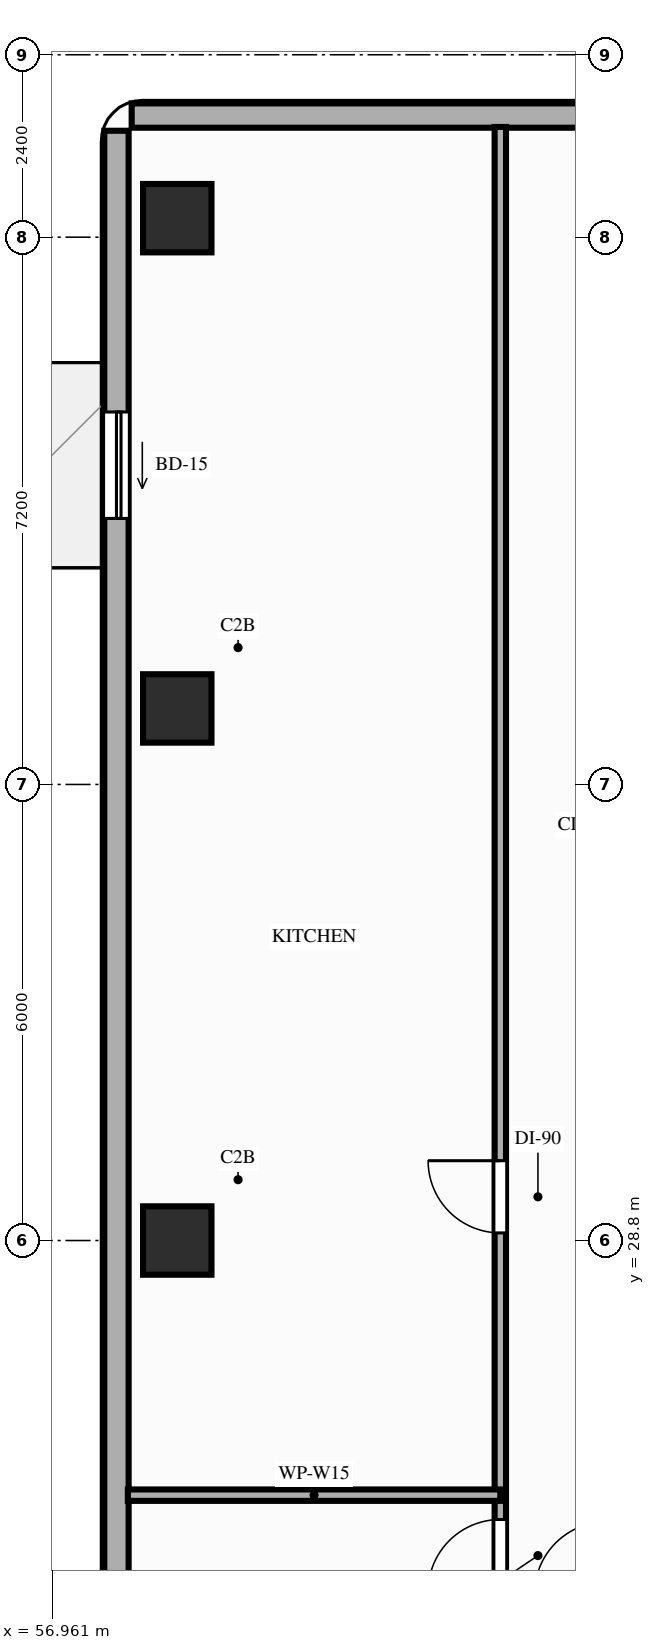
"""IFC4 building model, lengths in metres.
Left out: names, types, materials, properties, quantities, classifications, styles, units other than length and angle.
Written with IfcOpenShell. Run it as: python <this file> out.ifc"""

import sys

from ifc_helpers import new_model, si_unit, direction, frame, frame_2d, origin, origin_2d, place, context, subcontext, project, spatial, rectangle, extrude, element, fill, save


model = new_model("IFC4")
c1 = context("Model", 3, precision=1e-05, world=origin(), true_north=direction((0.0, 1.0)))
c2 = subcontext(c1, "Body", "Model", "MODEL_VIEW")
j1 = project(units=[si_unit("LENGTHUNIT", "METRE"), si_unit("PLANEANGLEUNIT", "RADIAN")], contexts=[c1])
p1 = place(None, origin())
s1 = spatial("IfcSite", under=j1, at=p1, CompositionType="ELEMENT")
p2 = place(p1, origin())
s2 = spatial("IfcBuilding", under=s1, at=p2, CompositionType="ELEMENT")
p3 = place(p2, frame((0.0, 0.0, 59.6)))
s3 = spatial("IfcBuildingStorey", under=s2, at=p3, CompositionType="ELEMENT", Elevation=59.6)
for number, where, z_axis, x_axis in (
    (1, (58.6, 28.8, 0.0), (0.0, 0.0, 1.0), (1.0, 0.0, 0.0)),
    (2, (58.6, 35.8, 0.0), (0.0, 0.0, 1.0), (1.0, 0.0, 0.0)),
    (3, (58.6, 42.25, 0.0), (0.0, 0.0, 1.0), (1.0, 0.0, 0.0)),
):
    element("IfcColumn", number, at=place(p3, frame(where, z_axis=z_axis, x_axis=x_axis)), inside=s3, PredefinedType="COLUMN", context=c2, shape_type="SweptSolid", body=[
        extrude(rectangle(XDim=0.9, YDim=0.9, at=origin_2d()), origin(), (0.0, 0.0, 1.0), 3.2),
    ])
p4 = place(p3, frame((57.8, 43.4, 0.0), z_axis=(0.0, 0.0, 1.0), x_axis=(0.0, -1.0, 0.0)))
e4 = element("IfcWall", 4, at=p4, inside=s3, PredefinedType="STANDARD", context=c2, shape_type="SweptSolid", body=[
    extrude(rectangle(XDim=22.6, YDim=0.32, at=frame_2d((11.3, 0.0))), origin(), (0.0, 0.0, 1.0), 2.5),
])
p5 = place(p4, frame((3.7, 0.0, 0.0)))
e5 = element("IfcOpeningElement", 5, at=p5, cuts=e4, PredefinedType="OPENING", context=c2, shape_type="SweptSolid", body=[
    extrude(rectangle(XDim=1.4, YDim=2.1, at=frame_2d((0.7, 1.05))), frame((0.0, 0.17, 0.0), z_axis=(0.0, -1.0, 0.0), x_axis=(1.0, 0.0, 0.0)), (0.0, 0.0, 1.0), 0.34),
])
p6 = place(p3, frame((72.8, 43.6, 0.0), z_axis=(0.0, 0.0, 1.0), x_axis=(-1.0, 0.0, 0.0)))
e6 = element("IfcWall", 6, at=p6, inside=s3, PredefinedType="STANDARD", context=c2, shape_type="SweptSolid", body=[
    extrude(rectangle(XDim=14.8, YDim=0.32, at=frame_2d((7.4, 0.0))), origin(), (0.0, 0.0, 1.0), 3.02),
])
p7 = place(p3, frame((62.85, 20.75, 0.0), z_axis=(0.0, 0.0, 1.0), x_axis=(0.0, 1.0, 0.0)))
e7 = element("IfcWall", 7, at=p7, inside=s3, PredefinedType="PARTITIONING", context=c2, shape_type="SweptSolid", body=[
    extrude(rectangle(XDim=22.7, YDim=0.15, at=frame_2d((11.35, 0.0))), origin(), (0.0, 0.0, 1.0), 2.5),
])
p8 = place(p7, frame((0.73, 0.0, 0.0)))
e8 = element("IfcOpeningElement", 8, at=p8, cuts=e7, PredefinedType="OPENING", context=c2, shape_type="SweptSolid", body=[
    extrude(rectangle(XDim=0.85, YDim=2.1, at=frame_2d((0.425, 1.05))), frame((0.0, 0.085, 0.0), z_axis=(0.0, -1.0, 0.0), x_axis=(1.0, 0.0, 0.0)), (0.0, 0.0, 1.0), 0.17),
])
p9 = place(p7, frame((3.43, 0.0, 0.0)))
e9 = element("IfcOpeningElement", 9, at=p9, cuts=e7, PredefinedType="OPENING", context=c2, shape_type="SweptSolid", body=[
    extrude(rectangle(XDim=0.95, YDim=2.1, at=frame_2d((0.475, 1.05))), frame((0.0, 0.085, 0.0), z_axis=(0.0, -1.0, 0.0), x_axis=(1.0, 0.0, 0.0)), (0.0, 0.0, 1.0), 0.17),
])
p10 = place(p7, frame((8.15, 0.0, 0.0)))
e10 = element("IfcOpeningElement", 10, at=p10, cuts=e7, PredefinedType="OPENING", context=c2, shape_type="SweptSolid", body=[
    extrude(rectangle(XDim=0.95, YDim=2.15, at=frame_2d((0.475, 1.075))), frame((0.0, 0.085, 0.0), z_axis=(0.0, -1.0, 0.0), x_axis=(1.0, 0.0, 0.0)), (0.0, 0.0, 1.0), 0.17),
])
p11 = place(p3, frame((57.95, 25.45, 0.0), z_axis=(0.0, 0.0, 1.0), x_axis=(1.0, 0.0, 0.0)))
e11 = element("IfcWall", 11, at=p11, inside=s3, PredefinedType="PARTITIONING", context=c2, shape_type="SweptSolid", body=[
    extrude(rectangle(XDim=4.9, YDim=0.15, at=frame_2d((2.45, 0.0))), origin(), (0.0, 0.0, 1.0), 2.5),
])
p12 = place(p5, origin())
e12 = element("IfcDoor", 12, at=p12, inside=s3, OperationType="SLIDING_TO_RIGHT", PredefinedType="DOOR", context=c2, shape_type="SweptSolid", body=[
    extrude(rectangle(XDim=1.4, YDim=2.1, at=frame_2d((0.7, 1.05))), frame((0.0, 0.025, 0.0), z_axis=(0.0, -1.0, 0.0), x_axis=(1.0, 0.0, 0.0)), (0.0, 0.0, 1.0), 0.05),
])
fill(e5, e12)
p13 = place(p9, origin())
e13 = element("IfcDoor", 13, at=p13, inside=s3, OperationType="SINGLE_SWING_LEFT", PredefinedType="DOOR", context=c2, shape_type="SweptSolid", body=[
    extrude(rectangle(XDim=0.95, YDim=2.1, at=frame_2d((0.475, 1.05))), frame((0.0, 0.025, 0.0), z_axis=(0.0, -1.0, 0.0), x_axis=(1.0, 0.0, 0.0)), (0.0, 0.0, 1.0), 0.05),
])
fill(e9, e13)
p14 = place(p10, origin())
e14 = element("IfcDoor", 14, at=p14, inside=s3, OperationType="SINGLE_SWING_RIGHT", PredefinedType="DOOR", context=c2, shape_type="SweptSolid", body=[
    extrude(rectangle(XDim=0.95, YDim=2.15, at=frame_2d((0.475, 1.075))), frame((0.0, 0.025, 0.0), z_axis=(0.0, -1.0, 0.0), x_axis=(1.0, 0.0, 0.0)), (0.0, 0.0, 1.0), 0.05),
])
fill(e10, e14)
save(model, sys.argv[1])
